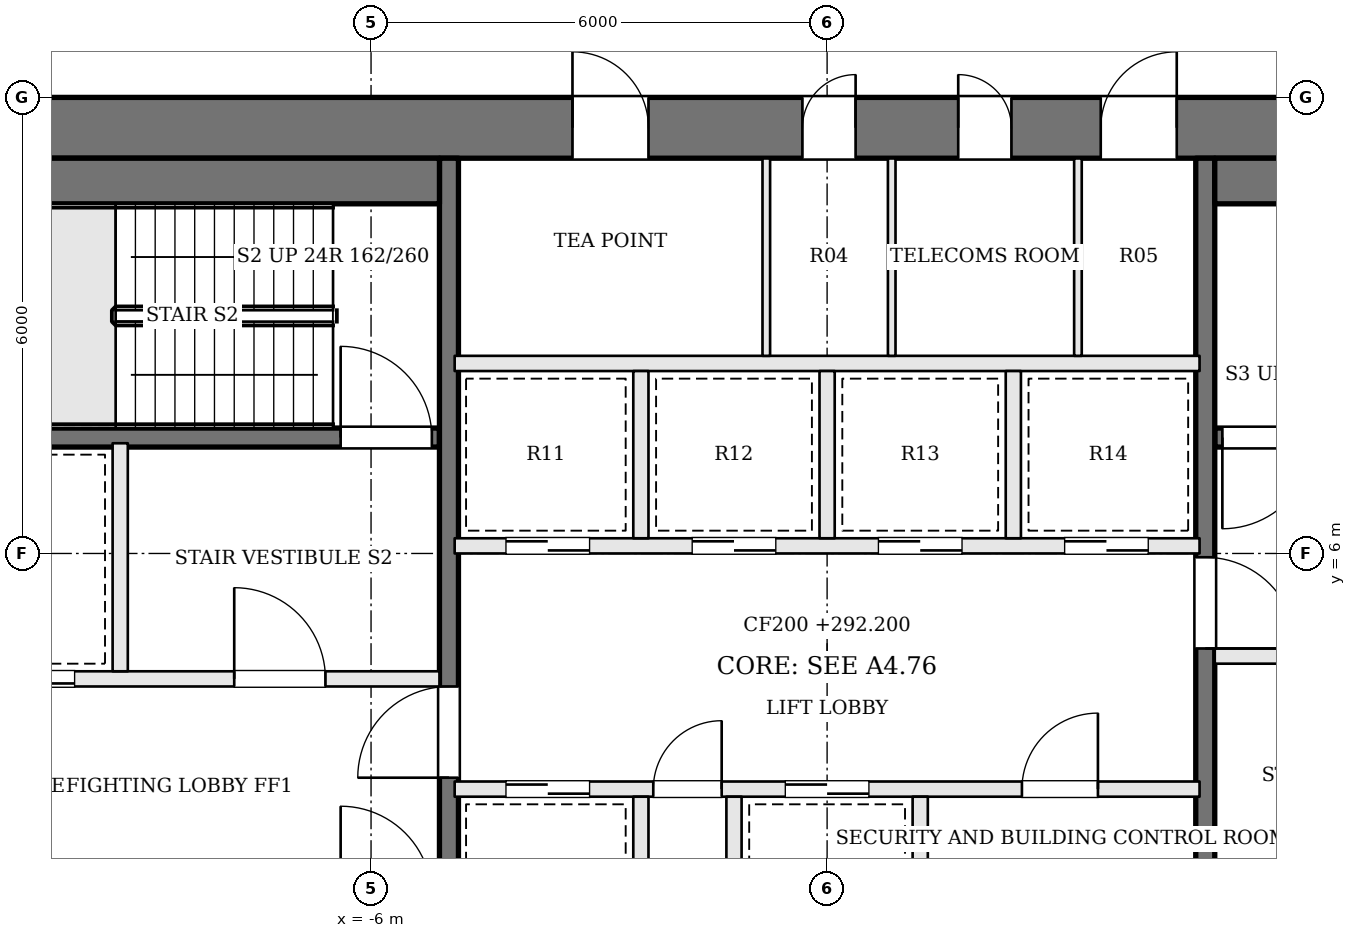
"""IFC4 building model, lengths in metres.
Left out: names, types, materials, properties, quantities, classifications, styles, units other than length and angle.
Written with IfcOpenShell. Run it as: python <this file> out.ifc"""

import sys

from ifc_helpers import new_model, si_unit, direction, frame, frame_2d, origin, place, context, subcontext, project, spatial, rectangle, extrude, element, fill, save


model = new_model("IFC4")
c1 = context("Model", 3, precision=1e-05, world=origin(), true_north=direction((0.0, 1.0)))
c2 = subcontext(c1, "Body", "Model", "MODEL_VIEW")
j1 = project(units=[si_unit("LENGTHUNIT", "METRE"), si_unit("PLANEANGLEUNIT", "RADIAN")], contexts=[c1])
p1 = place(None, origin())
s1 = spatial("IfcSite", under=j1, at=p1, CompositionType="ELEMENT")
p2 = place(p1, origin())
s2 = spatial("IfcBuilding", under=s1, at=p2, CompositionType="ELEMENT")
p3 = place(p2, frame((0.0, 0.0, 292.2)))
s3 = spatial("IfcBuildingStorey", under=s2, at=p3, CompositionType="ELEMENT", Elevation=292.2)
p4 = place(p3, frame((-13.0, 11.6, 0.0), z_axis=(0.0, 0.0, 1.0), x_axis=(1.0, 0.0, 0.0)))
e1 = element("IfcWall", 1, at=p4, inside=s3, PredefinedType="SHEAR", context=c2, shape_type="SweptSolid", body=[
    extrude(rectangle(XDim=26.0, YDim=0.8, at=frame_2d((13.0, 0.0))), origin(), (0.0, 0.0, 1.0), 3.9),
])
p5 = place(p4, frame((9.65, 0.0, 0.0)))
e2 = element("IfcOpeningElement", 2, at=p5, cuts=e1, PredefinedType="OPENING", context=c2, shape_type="SweptSolid", body=[
    extrude(rectangle(XDim=1.0, YDim=2.1, at=frame_2d((0.5, 1.05))), frame((0.0, 0.41, 0.0), z_axis=(0.0, -1.0, 0.0), x_axis=(1.0, 0.0, 0.0)), (0.0, 0.0, 1.0), 0.82),
])
p6 = place(p4, frame((12.675, 0.0, 0.0)))
e3 = element("IfcOpeningElement", 3, at=p6, cuts=e1, PredefinedType="OPENING", context=c2, shape_type="SweptSolid", body=[
    extrude(rectangle(XDim=0.7, YDim=2.1, at=frame_2d((0.35, 1.05))), frame((0.0, 0.41, 0.0), z_axis=(0.0, -1.0, 0.0), x_axis=(1.0, 0.0, 0.0)), (0.0, 0.0, 1.0), 0.82),
])
p7 = place(p4, frame((14.725, 0.0, 0.0)))
e4 = element("IfcOpeningElement", 4, at=p7, cuts=e1, PredefinedType="OPENING", context=c2, shape_type="SweptSolid", body=[
    extrude(rectangle(XDim=0.7, YDim=2.1, at=frame_2d((0.35, 1.05))), frame((0.0, 0.41, 0.0), z_axis=(0.0, -1.0, 0.0), x_axis=(1.0, 0.0, 0.0)), (0.0, 0.0, 1.0), 0.82),
])
p8 = place(p4, frame((16.6, 0.0, 0.0)))
e5 = element("IfcOpeningElement", 5, at=p8, cuts=e1, PredefinedType="OPENING", context=c2, shape_type="SweptSolid", body=[
    extrude(rectangle(XDim=1.0, YDim=2.1, at=frame_2d((0.5, 1.05))), frame((0.0, 0.41, 0.0), z_axis=(0.0, -1.0, 0.0), x_axis=(1.0, 0.0, 0.0)), (0.0, 0.0, 1.0), 0.82),
])
p9 = place(p3, frame((12.2, 7.525, 0.0), z_axis=(0.0, 0.0, 1.0), x_axis=(-1.0, 0.0, 0.0)))
e6 = element("IfcWall", 6, at=p9, inside=s3, PredefinedType="SOLIDWALL", context=c2, shape_type="SweptSolid", body=[
    extrude(rectangle(XDim=7.1, YDim=0.25, at=frame_2d((3.55, 0.0))), origin(), (0.0, 0.0, 1.0), 3.7),
])
p10 = place(p9, frame((5.8, 0.0, 0.0)))
e7 = element("IfcOpeningElement", 7, at=p10, cuts=e6, PredefinedType="OPENING", context=c2, shape_type="SweptSolid", body=[
    extrude(rectangle(XDim=1.2, YDim=2.1, at=frame_2d((0.6, 1.05))), frame((0.0, 0.135, 0.0), z_axis=(0.0, -1.0, 0.0), x_axis=(1.0, 0.0, 0.0)), (0.0, 0.0, 1.0), 0.27),
])
p11 = place(p3, frame((-12.2, 4.35, 0.0), z_axis=(0.0, 0.0, 1.0), x_axis=(1.0, 0.0, 0.0)))
e8 = element("IfcWall", 8, at=p11, inside=s3, PredefinedType="SOLIDWALL", context=c2, shape_type="SweptSolid", body=[
    extrude(rectangle(XDim=7.1, YDim=0.2, at=frame_2d((3.55, 0.0))), origin(), (0.0, 0.0, 1.0), 3.7),
])
p12 = place(p11, frame((4.4, 0.0, 0.0)))
e9 = element("IfcOpeningElement", 9, at=p12, cuts=e8, PredefinedType="OPENING", context=c2, shape_type="SweptSolid", body=[
    extrude(rectangle(XDim=1.2, YDim=2.1, at=frame_2d((0.6, 1.05))), frame((0.0, 0.11, 0.0), z_axis=(0.0, -1.0, 0.0), x_axis=(1.0, 0.0, 0.0)), (0.0, 0.0, 1.0), 0.22),
])
p13 = place(p11, frame((1.1, 0.0, 0.0)))
e10 = element("IfcOpeningElement", 10, at=p13, cuts=e8, PredefinedType="OPENING", context=c2, shape_type="SweptSolid", body=[
    extrude(rectangle(XDim=1.2, YDim=2.1, at=frame_2d((0.6, 1.05))), frame((0.0, 0.11, 0.0), z_axis=(0.0, -1.0, 0.0), x_axis=(1.0, 0.0, 0.0)), (0.0, 0.0, 1.0), 0.22),
])
p14 = place(p3, frame((12.2, 4.65, 0.0), z_axis=(0.0, 0.0, 1.0), x_axis=(-1.0, 0.0, 0.0)))
e11 = element("IfcWall", 11, at=p14, inside=s3, PredefinedType="SOLIDWALL", context=c2, shape_type="SweptSolid", body=[
    extrude(rectangle(XDim=7.1, YDim=0.2, at=frame_2d((3.55, 0.0))), origin(), (0.0, 0.0, 1.0), 3.7),
])
p15 = place(p14, frame((4.4, 0.0, 0.0)))
e12 = element("IfcOpeningElement", 12, at=p15, cuts=e11, PredefinedType="OPENING", context=c2, shape_type="SweptSolid", body=[
    extrude(rectangle(XDim=1.2, YDim=2.1, at=frame_2d((0.6, 1.05))), frame((0.0, 0.11, 0.0), z_axis=(0.0, -1.0, 0.0), x_axis=(1.0, 0.0, 0.0)), (0.0, 0.0, 1.0), 0.22),
])
p16 = place(p14, frame((1.1, 0.0, 0.0)))
e13 = element("IfcOpeningElement", 13, at=p16, cuts=e11, PredefinedType="OPENING", context=c2, shape_type="SweptSolid", body=[
    extrude(rectangle(XDim=1.2, YDim=2.1, at=frame_2d((0.6, 1.05))), frame((0.0, 0.11, 0.0), z_axis=(0.0, -1.0, 0.0), x_axis=(1.0, 0.0, 0.0)), (0.0, 0.0, 1.0), 0.22),
])
p17 = place(p3, frame((-12.2, 7.525, 0.0), z_axis=(0.0, 0.0, 1.0), x_axis=(1.0, 0.0, 0.0)))
e14 = element("IfcWall", 14, at=p17, inside=s3, PredefinedType="SOLIDWALL", context=c2, shape_type="SweptSolid", body=[
    extrude(rectangle(XDim=7.1, YDim=0.25, at=frame_2d((3.55, 0.0))), origin(), (0.0, 0.0, 1.0), 3.7),
])
p18 = place(p17, frame((5.8, 0.0, 0.0)))
e15 = element("IfcOpeningElement", 15, at=p18, cuts=e14, PredefinedType="OPENING", context=c2, shape_type="SweptSolid", body=[
    extrude(rectangle(XDim=1.2, YDim=2.1, at=frame_2d((0.6, 1.05))), frame((0.0, 0.135, 0.0), z_axis=(0.0, -1.0, 0.0), x_axis=(1.0, 0.0, 0.0)), (0.0, 0.0, 1.0), 0.27),
])
p19 = place(p3, frame((-9.3, 4.45, 0.0), z_axis=(0.0, 0.0, 1.0), x_axis=(0.0, 1.0, 0.0)))
e16 = element("IfcWall", 16, at=p19, inside=s3, PredefinedType="SOLIDWALL", context=c2, shape_type="SweptSolid", body=[
    extrude(rectangle(XDim=3.0, YDim=0.2, at=frame_2d((1.5, 0.0))), origin(), (0.0, 0.0, 1.0), 3.7),
])
p20 = place(p3, frame((-4.975, -2.2, 0.0), z_axis=(0.0, 0.0, 1.0), x_axis=(0.0, 1.0, 0.0)))
e17 = element("IfcWall", 17, at=p20, inside=s3, PredefinedType="SOLIDWALL", context=c2, shape_type="SweptSolid", body=[
    extrude(rectangle(XDim=13.4, YDim=0.25, at=frame_2d((6.7, 0.0))), origin(), (0.0, 0.0, 1.0), 3.7),
])
p21 = place(p20, frame((5.25, 0.0, 0.0)))
e18 = element("IfcOpeningElement", 18, at=p21, cuts=e17, PredefinedType="OPENING", context=c2, shape_type="SweptSolid", body=[
    extrude(rectangle(XDim=1.2, YDim=2.1, at=frame_2d((0.6, 1.05))), frame((0.0, 0.135, 0.0), z_axis=(0.0, -1.0, 0.0), x_axis=(1.0, 0.0, 0.0)), (0.0, 0.0, 1.0), 0.27),
])
p22 = place(p3, frame((4.975, 11.2, 0.0), z_axis=(0.0, 0.0, 1.0), x_axis=(0.0, -1.0, 0.0)))
e19 = element("IfcWall", 19, at=p22, inside=s3, PredefinedType="SOLIDWALL", context=c2, shape_type="SweptSolid", body=[
    extrude(rectangle(XDim=13.4, YDim=0.25, at=frame_2d((6.7, 0.0))), origin(), (0.0, 0.0, 1.0), 3.7),
])
p23 = place(p22, frame((5.25, 0.0, 0.0)))
e20 = element("IfcOpeningElement", 20, at=p23, cuts=e19, PredefinedType="OPENING", context=c2, shape_type="SweptSolid", body=[
    extrude(rectangle(XDim=1.2, YDim=2.1, at=frame_2d((0.6, 1.05))), frame((0.0, 0.135, 0.0), z_axis=(0.0, -1.0, 0.0), x_axis=(1.0, 0.0, 0.0)), (0.0, 0.0, 1.0), 0.27),
])
for number, where, z_axis, x_axis in (
    (21, (-12.2, 10.9, 0.0), (0.0, 0.0, 1.0), (1.0, 0.0, 0.0)),
    (22, (12.2, 10.9, 0.0), (0.0, 0.0, 1.0), (-1.0, 0.0, 0.0)),
):
    element("IfcWall", number, at=place(p3, frame(where, z_axis=z_axis, x_axis=x_axis)), inside=s3, PredefinedType="SOLIDWALL", context=c2, shape_type="SweptSolid", body=[
        extrude(rectangle(XDim=7.1, YDim=0.6, at=frame_2d((3.55, 0.0))), origin(), (0.0, 0.0, 1.0), 3.7),
    ])
p24 = place(p3, frame((-4.9, 2.9, 0.0), z_axis=(0.0, 0.0, 1.0), x_axis=(1.0, 0.0, 0.0)))
e23 = element("IfcWall", 23, at=p24, inside=s3, PredefinedType="SOLIDWALL", context=c2, shape_type="SweptSolid", body=[
    extrude(rectangle(XDim=9.8, YDim=0.2, at=frame_2d((4.9, 0.0))), origin(), (0.0, 0.0, 1.0), 3.7),
])
p25 = place(p24, frame((0.675, 0.0, 0.0)))
e24 = element("IfcOpeningElement", 24, at=p25, cuts=e23, PredefinedType="OPENING", context=c2, shape_type="SweptSolid", body=[
    extrude(rectangle(XDim=1.1, YDim=2.1, at=frame_2d((0.55, 1.05))), frame((0.0, 0.11, 0.0), z_axis=(0.0, -1.0, 0.0), x_axis=(1.0, 0.0, 0.0)), (0.0, 0.0, 1.0), 0.22),
])
p26 = place(p24, frame((2.613, 0.0, 0.0)))
e25 = element("IfcOpeningElement", 25, at=p26, cuts=e23, PredefinedType="OPENING", context=c2, shape_type="SweptSolid", body=[
    extrude(rectangle(XDim=0.9, YDim=2.1, at=frame_2d((0.45, 1.05))), frame((0.0, 0.11, 0.0), z_axis=(0.0, -1.0, 0.0), x_axis=(1.0, 0.0, 0.0)), (0.0, 0.0, 1.0), 0.22),
])
p27 = place(p24, frame((4.35, 0.0, 0.0)))
e26 = element("IfcOpeningElement", 26, at=p27, cuts=e23, PredefinedType="OPENING", context=c2, shape_type="SweptSolid", body=[
    extrude(rectangle(XDim=1.1, YDim=2.1, at=frame_2d((0.55, 1.05))), frame((0.0, 0.11, 0.0), z_axis=(0.0, -1.0, 0.0), x_axis=(1.0, 0.0, 0.0)), (0.0, 0.0, 1.0), 0.22),
])
p28 = place(p24, frame((7.463, 0.0, 0.0)))
e27 = element("IfcOpeningElement", 27, at=p28, cuts=e23, PredefinedType="OPENING", context=c2, shape_type="SweptSolid", body=[
    extrude(rectangle(XDim=1.0, YDim=2.1, at=frame_2d((0.5, 1.05))), frame((0.0, 0.11, 0.0), z_axis=(0.0, -1.0, 0.0), x_axis=(1.0, 0.0, 0.0)), (0.0, 0.0, 1.0), 0.22),
])
p29 = place(p3, frame((-4.9, 6.1, 0.0), z_axis=(0.0, 0.0, 1.0), x_axis=(1.0, 0.0, 0.0)))
e28 = element("IfcWall", 28, at=p29, inside=s3, PredefinedType="SOLIDWALL", context=c2, shape_type="SweptSolid", body=[
    extrude(rectangle(XDim=9.8, YDim=0.2, at=frame_2d((4.9, 0.0))), origin(), (0.0, 0.0, 1.0), 3.7),
])
p30 = place(p29, frame((0.675, 0.0, 0.0)))
e29 = element("IfcOpeningElement", 29, at=p30, cuts=e28, PredefinedType="OPENING", context=c2, shape_type="SweptSolid", body=[
    extrude(rectangle(XDim=1.1, YDim=2.1, at=frame_2d((0.55, 1.05))), frame((0.0, 0.11, 0.0), z_axis=(0.0, -1.0, 0.0), x_axis=(1.0, 0.0, 0.0)), (0.0, 0.0, 1.0), 0.22),
])
p31 = place(p29, frame((3.125, 0.0, 0.0)))
e30 = element("IfcOpeningElement", 30, at=p31, cuts=e28, PredefinedType="OPENING", context=c2, shape_type="SweptSolid", body=[
    extrude(rectangle(XDim=1.1, YDim=2.1, at=frame_2d((0.55, 1.05))), frame((0.0, 0.11, 0.0), z_axis=(0.0, -1.0, 0.0), x_axis=(1.0, 0.0, 0.0)), (0.0, 0.0, 1.0), 0.22),
])
p32 = place(p29, frame((5.575, 0.0, 0.0)))
e31 = element("IfcOpeningElement", 31, at=p32, cuts=e28, PredefinedType="OPENING", context=c2, shape_type="SweptSolid", body=[
    extrude(rectangle(XDim=1.1, YDim=2.1, at=frame_2d((0.55, 1.05))), frame((0.0, 0.11, 0.0), z_axis=(0.0, -1.0, 0.0), x_axis=(1.0, 0.0, 0.0)), (0.0, 0.0, 1.0), 0.22),
])
p33 = place(p29, frame((8.025, 0.0, 0.0)))
e32 = element("IfcOpeningElement", 32, at=p33, cuts=e28, PredefinedType="OPENING", context=c2, shape_type="SweptSolid", body=[
    extrude(rectangle(XDim=1.1, YDim=2.1, at=frame_2d((0.55, 1.05))), frame((0.0, 0.11, 0.0), z_axis=(0.0, -1.0, 0.0), x_axis=(1.0, 0.0, 0.0)), (0.0, 0.0, 1.0), 0.22),
])
p34 = place(p3, frame((-4.9, 8.5, 0.0), z_axis=(0.0, 0.0, 1.0), x_axis=(1.0, 0.0, 0.0)))
e33 = element("IfcWall", 33, at=p34, inside=s3, PredefinedType="SOLIDWALL", context=c2, shape_type="SweptSolid", body=[
    extrude(rectangle(XDim=9.8, YDim=0.2, at=frame_2d((4.9, 0.0))), origin(), (0.0, 0.0, 1.0), 3.7),
])
for number, where, z_axis, x_axis in (
    (34, (-2.45, 0.6, 0.0), (0.0, 0.0, 1.0), (0.0, 1.0, 0.0)),
    (35, (-1.225, 0.6, 0.0), (0.0, 0.0, 1.0), (0.0, 1.0, 0.0)),
    (36, (1.225, 0.6, 0.0), (0.0, 0.0, 1.0), (0.0, 1.0, 0.0)),
    (37, (-2.45, 6.2, 0.0), (0.0, 0.0, 1.0), (0.0, 1.0, 0.0)),
    (38, (0.0, 6.2, 0.0), (0.0, 0.0, 1.0), (0.0, 1.0, 0.0)),
    (39, (2.45, 6.2, 0.0), (0.0, 0.0, 1.0), (0.0, 1.0, 0.0)),
):
    element("IfcWall", number, at=place(p3, frame(where, z_axis=z_axis, x_axis=x_axis)), inside=s3, PredefinedType="SOLIDWALL", context=c2, shape_type="SweptSolid", body=[
        extrude(rectangle(XDim=2.2, YDim=0.2, at=frame_2d((1.1, 0.0))), origin(), (0.0, 0.0, 1.0), 3.7),
    ])
for number, where, z_axis, x_axis in (
    (40, (-0.8, 8.6, 0.0), (0.0, 0.0, 1.0), (0.0, 1.0, 0.0)),
    (41, (0.85, 8.6, 0.0), (0.0, 0.0, 1.0), (0.0, 1.0, 0.0)),
    (42, (3.3, 8.6, 0.0), (0.0, 0.0, 1.0), (0.0, 1.0, 0.0)),
):
    element("IfcWall", number, at=place(p3, frame(where, z_axis=z_axis, x_axis=x_axis)), inside=s3, PredefinedType="PARTITIONING", context=c2, shape_type="SweptSolid", body=[
        extrude(rectangle(XDim=2.6, YDim=0.1, at=frame_2d((1.3, 0.0))), origin(), (0.0, 0.0, 1.0), 3.7),
    ])
p35 = place(p21, origin())
e43 = element("IfcDoor", 43, at=p35, inside=s3, OperationType="SINGLE_SWING_LEFT", PredefinedType="DOOR", context=c2, shape_type="SweptSolid", body=[
    extrude(rectangle(XDim=1.2, YDim=2.1, at=frame_2d((0.6, 1.05))), frame((0.0, 0.025, 0.0), z_axis=(0.0, -1.0, 0.0), x_axis=(1.0, 0.0, 0.0)), (0.0, 0.0, 1.0), 0.05),
])
fill(e18, e43)
p36 = place(p23, origin())
e44 = element("IfcDoor", 44, at=p36, inside=s3, OperationType="SINGLE_SWING_RIGHT", PredefinedType="DOOR", context=c2, shape_type="SweptSolid", body=[
    extrude(rectangle(XDim=1.2, YDim=2.1, at=frame_2d((0.6, 1.05))), frame((0.0, 0.025, 0.0), z_axis=(0.0, -1.0, 0.0), x_axis=(1.0, 0.0, 0.0)), (0.0, 0.0, 1.0), 0.05),
])
fill(e20, e44)
p37 = place(p12, origin())
e45 = element("IfcDoor", 45, at=p37, inside=s3, OperationType="SINGLE_SWING_LEFT", PredefinedType="DOOR", context=c2, shape_type="SweptSolid", body=[
    extrude(rectangle(XDim=1.2, YDim=2.1, at=frame_2d((0.6, 1.05))), frame((0.0, 0.025, 0.0), z_axis=(0.0, -1.0, 0.0), x_axis=(1.0, 0.0, 0.0)), (0.0, 0.0, 1.0), 0.05),
])
fill(e9, e45)
p38 = place(p10, origin())
e46 = element("IfcDoor", 46, at=p38, inside=s3, OperationType="SINGLE_SWING_RIGHT", PredefinedType="DOOR", context=c2, shape_type="SweptSolid", body=[
    extrude(rectangle(XDim=1.2, YDim=2.1, at=frame_2d((0.6, 1.05))), frame((0.0, 0.025, 0.0), z_axis=(0.0, -1.0, 0.0), x_axis=(1.0, 0.0, 0.0)), (0.0, 0.0, 1.0), 0.05),
])
fill(e7, e46)
p39 = place(p18, origin())
e47 = element("IfcDoor", 47, at=p39, inside=s3, OperationType="SINGLE_SWING_LEFT", PredefinedType="DOOR", context=c2, shape_type="SweptSolid", body=[
    extrude(rectangle(XDim=1.2, YDim=2.1, at=frame_2d((0.6, 1.05))), frame((0.0, 0.025, 0.0), z_axis=(0.0, -1.0, 0.0), x_axis=(1.0, 0.0, 0.0)), (0.0, 0.0, 1.0), 0.05),
])
fill(e15, e47)
p40 = place(p13, origin())
e48 = element("IfcDoor", 48, at=p40, inside=s3, OperationType="SLIDING_TO_RIGHT", PredefinedType="DOOR", context=c2, shape_type="SweptSolid", body=[
    extrude(rectangle(XDim=1.2, YDim=2.1, at=frame_2d((0.6, 1.05))), frame((0.0, 0.025, 0.0), z_axis=(0.0, -1.0, 0.0), x_axis=(1.0, 0.0, 0.0)), (0.0, 0.0, 1.0), 0.05),
])
fill(e10, e48)
p41 = place(p25, origin())
e49 = element("IfcDoor", 49, at=p41, inside=s3, OperationType="SLIDING_TO_RIGHT", PredefinedType="DOOR", context=c2, shape_type="SweptSolid", body=[
    extrude(rectangle(XDim=1.1, YDim=2.1, at=frame_2d((0.55, 1.05))), frame((0.0, 0.025, 0.0), z_axis=(0.0, -1.0, 0.0), x_axis=(1.0, 0.0, 0.0)), (0.0, 0.0, 1.0), 0.05),
])
fill(e24, e49)
p42 = place(p26, origin())
e50 = element("IfcDoor", 50, at=p42, inside=s3, OperationType="SINGLE_SWING_RIGHT", PredefinedType="DOOR", context=c2, shape_type="SweptSolid", body=[
    extrude(rectangle(XDim=0.9, YDim=2.1, at=frame_2d((0.45, 1.05))), frame((0.0, 0.025, 0.0), z_axis=(0.0, -1.0, 0.0), x_axis=(1.0, 0.0, 0.0)), (0.0, 0.0, 1.0), 0.05),
])
fill(e25, e50)
p43 = place(p27, origin())
e51 = element("IfcDoor", 51, at=p43, inside=s3, OperationType="SLIDING_TO_LEFT", PredefinedType="DOOR", context=c2, shape_type="SweptSolid", body=[
    extrude(rectangle(XDim=1.1, YDim=2.1, at=frame_2d((0.55, 1.05))), frame((0.0, 0.025, 0.0), z_axis=(0.0, -1.0, 0.0), x_axis=(1.0, 0.0, 0.0)), (0.0, 0.0, 1.0), 0.05),
])
fill(e26, e51)
p44 = place(p28, origin())
e52 = element("IfcDoor", 52, at=p44, inside=s3, OperationType="SINGLE_SWING_RIGHT", PredefinedType="DOOR", context=c2, shape_type="SweptSolid", body=[
    extrude(rectangle(XDim=1.0, YDim=2.1, at=frame_2d((0.5, 1.05))), frame((0.0, 0.025, 0.0), z_axis=(0.0, -1.0, 0.0), x_axis=(1.0, 0.0, 0.0)), (0.0, 0.0, 1.0), 0.05),
])
fill(e27, e52)
p45 = place(p30, origin())
e53 = element("IfcDoor", 53, at=p45, inside=s3, OperationType="SLIDING_TO_RIGHT", PredefinedType="DOOR", context=c2, shape_type="SweptSolid", body=[
    extrude(rectangle(XDim=1.1, YDim=2.1, at=frame_2d((0.55, 1.05))), frame((0.0, 0.025, 0.0), z_axis=(0.0, -1.0, 0.0), x_axis=(1.0, 0.0, 0.0)), (0.0, 0.0, 1.0), 0.05),
])
fill(e29, e53)
p46 = place(p31, origin())
e54 = element("IfcDoor", 54, at=p46, inside=s3, OperationType="SLIDING_TO_LEFT", PredefinedType="DOOR", context=c2, shape_type="SweptSolid", body=[
    extrude(rectangle(XDim=1.1, YDim=2.1, at=frame_2d((0.55, 1.05))), frame((0.0, 0.025, 0.0), z_axis=(0.0, -1.0, 0.0), x_axis=(1.0, 0.0, 0.0)), (0.0, 0.0, 1.0), 0.05),
])
fill(e30, e54)
p47 = place(p32, origin())
e55 = element("IfcDoor", 55, at=p47, inside=s3, OperationType="SLIDING_TO_RIGHT", PredefinedType="DOOR", context=c2, shape_type="SweptSolid", body=[
    extrude(rectangle(XDim=1.1, YDim=2.1, at=frame_2d((0.55, 1.05))), frame((0.0, 0.025, 0.0), z_axis=(0.0, -1.0, 0.0), x_axis=(1.0, 0.0, 0.0)), (0.0, 0.0, 1.0), 0.05),
])
fill(e31, e55)
p48 = place(p33, origin())
e56 = element("IfcDoor", 56, at=p48, inside=s3, OperationType="SLIDING_TO_LEFT", PredefinedType="DOOR", context=c2, shape_type="SweptSolid", body=[
    extrude(rectangle(XDim=1.1, YDim=2.1, at=frame_2d((0.55, 1.05))), frame((0.0, 0.025, 0.0), z_axis=(0.0, -1.0, 0.0), x_axis=(1.0, 0.0, 0.0)), (0.0, 0.0, 1.0), 0.05),
])
fill(e32, e56)
p49 = place(p5, origin())
e57 = element("IfcDoor", 57, at=p49, inside=s3, OperationType="SINGLE_SWING_LEFT", PredefinedType="DOOR", context=c2, shape_type="SweptSolid", body=[
    extrude(rectangle(XDim=1.0, YDim=2.1, at=frame_2d((0.5, 1.05))), frame((0.0, 0.025, 0.0), z_axis=(0.0, -1.0, 0.0), x_axis=(1.0, 0.0, 0.0)), (0.0, 0.0, 1.0), 0.05),
])
fill(e2, e57)
p50 = place(p6, origin())
e58 = element("IfcDoor", 58, at=p50, inside=s3, OperationType="SINGLE_SWING_RIGHT", PredefinedType="DOOR", context=c2, shape_type="SweptSolid", body=[
    extrude(rectangle(XDim=0.7, YDim=2.1, at=frame_2d((0.35, 1.05))), frame((0.0, 0.025, 0.0), z_axis=(0.0, -1.0, 0.0), x_axis=(1.0, 0.0, 0.0)), (0.0, 0.0, 1.0), 0.05),
])
fill(e3, e58)
p51 = place(p7, origin())
e59 = element("IfcDoor", 59, at=p51, inside=s3, OperationType="SINGLE_SWING_LEFT", PredefinedType="DOOR", context=c2, shape_type="SweptSolid", body=[
    extrude(rectangle(XDim=0.7, YDim=2.1, at=frame_2d((0.35, 1.05))), frame((0.0, 0.025, 0.0), z_axis=(0.0, -1.0, 0.0), x_axis=(1.0, 0.0, 0.0)), (0.0, 0.0, 1.0), 0.05),
])
fill(e4, e59)
p52 = place(p8, origin())
e60 = element("IfcDoor", 60, at=p52, inside=s3, OperationType="SINGLE_SWING_RIGHT", PredefinedType="DOOR", context=c2, shape_type="SweptSolid", body=[
    extrude(rectangle(XDim=1.0, YDim=2.1, at=frame_2d((0.5, 1.05))), frame((0.0, 0.025, 0.0), z_axis=(0.0, -1.0, 0.0), x_axis=(1.0, 0.0, 0.0)), (0.0, 0.0, 1.0), 0.05),
])
fill(e5, e60)
save(model, sys.argv[1])
